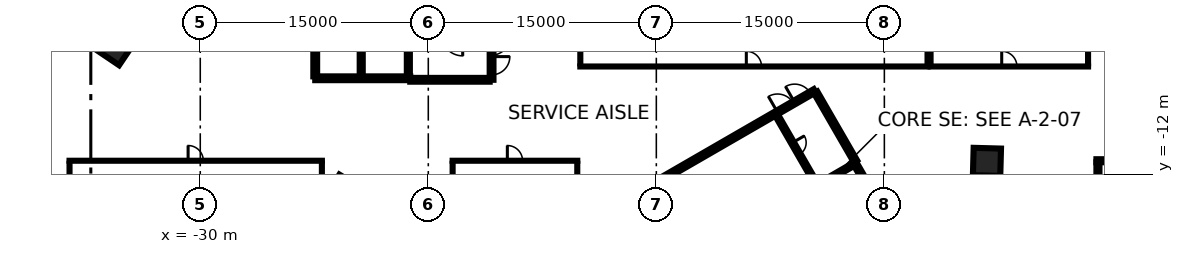
"""IFC4 building model, lengths in metres.
Left out: names, types, materials, properties, quantities, classifications, styles, units other than length and angle.
Written with IfcOpenShell. Run it as: python <this file> out.ifc"""

import sys

from ifc_helpers import new_model, si_unit, direction, frame, frame_2d, origin, origin_2d, place, context, subcontext, project, spatial, rectangle, extrude, element, fill, save


model = new_model("IFC4")
c1 = context("Model", 3, precision=1e-05, world=origin(), true_north=direction((0.0, 1.0)))
c2 = subcontext(c1, "Body", "Model", "MODEL_VIEW")
j1 = project(units=[si_unit("LENGTHUNIT", "METRE"), si_unit("PLANEANGLEUNIT", "RADIAN")], contexts=[c1])
p1 = place(None, origin())
s1 = spatial("IfcSite", under=j1, at=p1, CompositionType="ELEMENT")
p2 = place(p1, origin())
s2 = spatial("IfcBuilding", under=s1, at=p2, CompositionType="ELEMENT")
p3 = place(p2, frame((0.0, 0.0, -3.6)))
s3 = spatial("IfcBuildingStorey", under=s2, at=p3, CompositionType="ELEMENT", Elevation=-3.6)
for number, where, z_axis, x_axis in (
    (1, (21.749, -11.174, -0.4), (0.0, 0.0, 1.0), (-1.0, 0.027, 0.0)),
    (2, (-35.583, -3.565, -0.4), (0.0, 0.0, 1.0), (0.559, 0.829, 0.0)),
):
    element("IfcColumn", number, at=place(p3, frame(where, z_axis=z_axis, x_axis=x_axis)), inside=s3, PredefinedType="COLUMN", context=c2, shape_type="SweptSolid", body=[
        extrude(rectangle(XDim=1.8, YDim=1.8, at=origin_2d()), origin(), (0.0, 0.0, 1.0), 3.55),
    ])
p4 = place(p3, frame((-10.837, 5.775, 0.0), z_axis=(0.0, 0.0, 1.0), x_axis=(0.0, -1.0, 0.0)))
e3 = element("IfcWall", 3, at=p4, inside=s3, PredefinedType="SHEAR", context=c2, shape_type="SweptSolid", body=[
    extrude(rectangle(XDim=11.55, YDim=0.25, at=frame_2d((5.775, 0.0))), origin(), (0.0, 0.0, 1.0), 3.15),
])
p5 = place(p4, frame((10.025, 0.0, 0.0)))
e4 = element("IfcOpeningElement", 4, at=p5, cuts=e3, PredefinedType="OPENING", context=c2, shape_type="SweptSolid", body=[
    extrude(rectangle(XDim=1.2, YDim=2.1, at=frame_2d((0.6, 1.05))), frame((0.0, 0.135, 0.0), z_axis=(0.0, -1.0, 0.0), x_axis=(1.0, 0.0, 0.0)), (0.0, 0.0, 1.0), 0.27),
])
p6 = place(p4, frame((8.725, 0.0, 0.0)))
e5 = element("IfcOpeningElement", 5, at=p6, cuts=e3, PredefinedType="OPENING", context=c2, shape_type="SweptSolid", body=[
    extrude(rectangle(XDim=1.2, YDim=2.1, at=frame_2d((0.6, 1.05))), frame((0.0, 0.135, 0.0), z_axis=(0.0, -1.0, 0.0), x_axis=(1.0, 0.0, 0.0)), (0.0, 0.0, 1.0), 0.27),
])
p7 = place(p3, frame((-16.187, -5.675, 0.0), z_axis=(0.0, 0.0, 1.0), x_axis=(-1.0, 0.0, 0.0)))
e6 = element("IfcWall", 6, at=p7, inside=s3, PredefinedType="SHEAR", context=c2, shape_type="SweptSolid", body=[
    extrude(rectangle(XDim=6.25, YDim=0.25, at=frame_2d((3.125, 0.0))), origin(), (0.0, 0.0, 1.0), 3.15),
])
p8 = place(p3, frame((-10.963, -5.775, 0.0), z_axis=(0.0, 0.0, 1.0), x_axis=(-1.0, 0.0, 0.0)))
e7 = element("IfcWall", 7, at=p8, inside=s3, PredefinedType="SHEAR", context=c2, shape_type="SweptSolid", body=[
    extrude(rectangle(XDim=5.225, YDim=0.25, at=frame_2d((2.612, 0.0))), origin(), (0.0, 0.0, 1.0), 3.15),
])
p9 = place(p3, frame((-22.437, -5.55, 0.0), z_axis=(0.0, 0.0, 1.0), x_axis=(0.0, 1.0, 0.0)))
e8 = element("IfcWall", 8, at=p9, inside=s3, PredefinedType="SHEAR", context=c2, shape_type="SweptSolid", body=[
    extrude(rectangle(XDim=1.849, YDim=0.25, at=frame_2d((0.925, 0.0))), origin(), (0.0, 0.0, 1.0), 3.15),
])
p10 = place(p3, frame((-16.312, -2.898, 0.0), z_axis=(0.0, 0.0, 1.0), x_axis=(0.0, -1.0, 0.0)))
e9 = element("IfcWall", 9, at=p10, inside=s3, PredefinedType="SHEAR", context=c2, shape_type="SweptSolid", body=[
    extrude(rectangle(XDim=2.651, YDim=0.2, at=frame_2d((1.325, 0.0))), origin(), (0.0, 0.0, 1.0), 3.15),
])
p11 = place(p10, frame((0.652, 0.0, 0.0)))
e10 = element("IfcOpeningElement", 10, at=p11, cuts=e9, PredefinedType="OPENING", context=c2, shape_type="SweptSolid", body=[
    extrude(rectangle(XDim=1.3, YDim=2.1, at=frame_2d((0.65, 1.05))), frame((0.0, 0.11, 0.0), z_axis=(0.0, -1.0, 0.0), x_axis=(1.0, 0.0, 0.0)), (0.0, 0.0, 1.0), 0.22),
])
p12 = place(p3, frame((-19.412, -5.549, 0.0), z_axis=(0.0, 0.0, 1.0), x_axis=(0.0, 1.0, 0.0)))
e11 = element("IfcWall", 11, at=p12, inside=s3, PredefinedType="SHEAR", context=c2, shape_type="SweptSolid", body=[
    extrude(rectangle(XDim=2.651, YDim=0.2, at=frame_2d((1.325, 0.0))), origin(), (0.0, 0.0, 1.0), 3.15),
])
p13 = place(p3, frame((0.417, -12.273, 0.0), z_axis=(0.0, 0.0, 1.0), x_axis=(0.866021906294, 0.500006057782, 0.0)))
e12 = element("IfcWall", 12, at=p13, inside=s3, PredefinedType="SHEAR", context=c2, shape_type="SweptSolid", body=[
    extrude(rectangle(XDim=11.55, YDim=0.25, at=frame_2d((5.775, 0.0))), origin(), (0.0, 0.0, 1.0), 3.15),
])
p14 = place(p13, frame((10.025, 0.0, 0.0)))
e13 = element("IfcOpeningElement", 13, at=p14, cuts=e12, PredefinedType="OPENING", context=c2, shape_type="SweptSolid", body=[
    extrude(rectangle(XDim=1.2, YDim=2.1, at=frame_2d((0.6, 1.05))), frame((0.0, 0.135, 0.0), z_axis=(0.0, -1.0, 0.0), x_axis=(1.0, 0.0, 0.0)), (0.0, 0.0, 1.0), 0.27),
])
p15 = place(p13, frame((8.725, 0.0, 0.0)))
e14 = element("IfcOpeningElement", 14, at=p15, cuts=e12, PredefinedType="OPENING", context=c2, shape_type="SweptSolid", body=[
    extrude(rectangle(XDim=1.2, YDim=2.1, at=frame_2d((0.6, 1.05))), frame((0.0, 0.135, 0.0), z_axis=(0.0, -1.0, 0.0), x_axis=(1.0, 0.0, 0.0)), (0.0, 0.0, 1.0), 0.27),
])
p16 = place(p3, frame((13.008, -11.181, 0.0), z_axis=(0.0, 0.0, 1.0), x_axis=(0.500004234368, -0.866022959057, 0.0)))
e15 = element("IfcWall", 15, at=p16, inside=s3, PredefinedType="SHEAR", context=c2, shape_type="SweptSolid", body=[
    extrude(rectangle(XDim=6.25, YDim=0.25, at=frame_2d((3.125, 0.0))), origin(), (0.0, 0.0, 1.0), 3.15),
])
p17 = place(p3, frame((10.483, -6.606, 0.0), z_axis=(0.0, 0.0, 1.0), x_axis=(0.49999885962, -0.866026062182, 0.0)))
e16 = element("IfcWall", 16, at=p17, inside=s3, PredefinedType="SHEAR", context=c2, shape_type="SweptSolid", body=[
    extrude(rectangle(XDim=5.225, YDim=0.25, at=frame_2d((2.612, 0.0))), origin(), (0.0, 0.0, 1.0), 3.15),
])
p18 = place(p3, frame((7.906, -8.094, 0.0), z_axis=(0.0, 0.0, 1.0), x_axis=(0.500012186204, -0.866018367962, 0.0)))
e17 = element("IfcWall", 17, at=p18, inside=s3, PredefinedType="SHEAR", context=c2, shape_type="SweptSolid", body=[
    extrude(rectangle(XDim=5.349, YDim=0.2, at=frame_2d((2.674, 0.0))), origin(), (0.0, 0.0, 1.0), 3.15),
])
p19 = place(p18, frame((2.099, 0.0, 0.0)))
e18 = element("IfcOpeningElement", 18, at=p19, cuts=e17, PredefinedType="OPENING", context=c2, shape_type="SweptSolid", body=[
    extrude(rectangle(XDim=0.9, YDim=2.1, at=frame_2d((0.45, 1.05))), frame((0.0, 0.11, 0.0), z_axis=(0.0, -1.0, 0.0), x_axis=(1.0, 0.0, 0.0)), (0.0, 0.0, 1.0), 0.22),
])
p20 = place(p3, frame((10.668, -12.677, 0.0), z_axis=(0.0, 0.0, 1.0), x_axis=(0.866016748302, 0.500014991436, 0.0)))
e19 = element("IfcWall", 19, at=p20, inside=s3, PredefinedType="SHEAR", context=c2, shape_type="SweptSolid", body=[
    extrude(rectangle(XDim=2.649, YDim=0.2, at=frame_2d((1.324, 0.0))), origin(), (0.0, 0.0, 1.0), 3.15),
])
p21 = place(p20, frame((0.65, 0.0, 0.0)))
e20 = element("IfcOpeningElement", 20, at=p21, cuts=e19, PredefinedType="OPENING", context=c2, shape_type="SweptSolid", body=[
    extrude(rectangle(XDim=1.3, YDim=2.1, at=frame_2d((0.65, 1.05))), frame((0.0, 0.11, 0.0), z_axis=(0.0, -1.0, 0.0), x_axis=(1.0, 0.0, 0.0)), (0.0, 0.0, 1.0), 0.22),
])
p22 = place(p3, frame((-38.7, -11.1, 0.0), z_axis=(0.0, 0.0, 1.0), x_axis=(1.0, 0.0, 0.0)))
e21 = element("IfcWall", 21, at=p22, inside=s3, PredefinedType="PARTITIONING", context=c2, shape_type="SweptSolid", body=[
    extrude(rectangle(XDim=16.8, YDim=0.2, at=frame_2d((8.4, 0.0))), origin(), (0.0, 0.0, 1.0), 3.15),
])
p23 = place(p22, frame((7.9, 0.0, 0.0)))
e22 = element("IfcOpeningElement", 22, at=p23, cuts=e21, PredefinedType="OPENING", context=c2, shape_type="SweptSolid", body=[
    extrude(rectangle(XDim=1.0, YDim=2.1, at=frame_2d((0.5, 1.05))), frame((0.0, 0.11, 0.0), z_axis=(0.0, -1.0, 0.0), x_axis=(1.0, 0.0, 0.0)), (0.0, 0.0, 1.0), 0.22),
])
for number, where, z_axis, x_axis in (
    (23, (-38.6, -15.4, 0.0), (0.0, 0.0, 1.0), (0.0, 1.0, 0.0)),
    (24, (-22.0, -15.4, 0.0), (0.0, 0.0, 1.0), (0.0, 1.0, 0.0)),
):
    element("IfcWall", number, at=place(p3, frame(where, z_axis=z_axis, x_axis=x_axis)), inside=s3, PredefinedType="PARTITIONING", context=c2, shape_type="SweptSolid", body=[
        extrude(rectangle(XDim=4.2, YDim=0.2, at=frame_2d((2.1, 0.0))), origin(), (0.0, 0.0, 1.0), 3.15),
    ])
p24 = place(p3, frame((-13.5, -11.1, 0.0), z_axis=(0.0, 0.0, 1.0), x_axis=(1.0, 0.0, 0.0)))
e25 = element("IfcWall", 25, at=p24, inside=s3, PredefinedType="PARTITIONING", context=c2, shape_type="SweptSolid", body=[
    extrude(rectangle(XDim=8.4, YDim=0.2, at=frame_2d((4.2, 0.0))), origin(), (0.0, 0.0, 1.0), 3.15),
])
p25 = place(p24, frame((3.7, 0.0, 0.0)))
e26 = element("IfcOpeningElement", 26, at=p25, cuts=e25, PredefinedType="OPENING", context=c2, shape_type="SweptSolid", body=[
    extrude(rectangle(XDim=1.0, YDim=2.1, at=frame_2d((0.5, 1.05))), frame((0.0, 0.11, 0.0), z_axis=(0.0, -1.0, 0.0), x_axis=(1.0, 0.0, 0.0)), (0.0, 0.0, 1.0), 0.22),
])
for number, where, z_axis, x_axis in (
    (27, (-13.4, -15.4, 0.0), (0.0, 0.0, 1.0), (0.0, 1.0, 0.0)),
    (28, (-5.2, -15.4, 0.0), (0.0, 0.0, 1.0), (0.0, 1.0, 0.0)),
):
    element("IfcWall", number, at=place(p3, frame(where, z_axis=z_axis, x_axis=x_axis)), inside=s3, PredefinedType="PARTITIONING", context=c2, shape_type="SweptSolid", body=[
        extrude(rectangle(XDim=4.2, YDim=0.2, at=frame_2d((2.1, 0.0))), origin(), (0.0, 0.0, 1.0), 3.15),
    ])
p26 = place(p3, frame((-5.1, -4.9, 0.0), z_axis=(0.0, 0.0, 1.0), x_axis=(1.0, 0.0, 0.0)))
e29 = element("IfcWall", 29, at=p26, inside=s3, PredefinedType="PARTITIONING", context=c2, shape_type="SweptSolid", body=[
    extrude(rectangle(XDim=23.04, YDim=0.2, at=frame_2d((11.52, 0.0))), origin(), (0.0, 0.0, 1.0), 3.15),
])
p27 = place(p26, frame((11.02, 0.0, 0.0)))
e30 = element("IfcOpeningElement", 30, at=p27, cuts=e29, PredefinedType="OPENING", context=c2, shape_type="SweptSolid", body=[
    extrude(rectangle(XDim=1.0, YDim=2.1, at=frame_2d((0.5, 1.05))), frame((0.0, 0.11, 0.0), z_axis=(0.0, -1.0, 0.0), x_axis=(1.0, 0.0, 0.0)), (0.0, 0.0, 1.0), 0.22),
])
p28 = place(p3, frame((-5.0, -4.8, 0.0), z_axis=(0.0, 0.0, 1.0), x_axis=(0.0, 1.0, 0.0)))
e31 = element("IfcWall", 31, at=p28, inside=s3, PredefinedType="PARTITIONING", context=c2, shape_type="SweptSolid", body=[
    extrude(rectangle(XDim=4.2, YDim=0.2, at=frame_2d((2.1, 0.0))), origin(), (0.0, 0.0, 1.0), 3.15),
])
p29 = place(p3, frame((17.84, -4.8, 0.0), z_axis=(0.0, 0.0, 1.0), x_axis=(0.0, 1.0, 0.0)))
e32 = element("IfcWall", 32, at=p29, inside=s3, PredefinedType="PARTITIONING", context=c2, shape_type="SweptSolid", body=[
    extrude(rectangle(XDim=4.6, YDim=0.2, at=frame_2d((2.3, 0.0))), origin(), (0.0, 0.0, 1.0), 3.15),
])
p30 = place(p3, frame((17.94, -4.9, 0.0), z_axis=(0.0, 0.0, 1.0), x_axis=(1.0, 0.0, 0.0)))
e33 = element("IfcWall", 33, at=p30, inside=s3, PredefinedType="PARTITIONING", context=c2, shape_type="SweptSolid", body=[
    extrude(rectangle(XDim=10.56, YDim=0.2, at=frame_2d((5.28, 0.0))), origin(), (0.0, 0.0, 1.0), 3.15),
])
p31 = place(p30, frame((4.78, 0.0, 0.0)))
e34 = element("IfcOpeningElement", 34, at=p31, cuts=e33, PredefinedType="OPENING", context=c2, shape_type="SweptSolid", body=[
    extrude(rectangle(XDim=1.0, YDim=2.1, at=frame_2d((0.5, 1.05))), frame((0.0, 0.11, 0.0), z_axis=(0.0, -1.0, 0.0), x_axis=(1.0, 0.0, 0.0)), (0.0, 0.0, 1.0), 0.22),
])
p32 = place(p3, frame((18.04, -4.8, 0.0), z_axis=(0.0, 0.0, 1.0), x_axis=(0.0, 1.0, 0.0)))
e35 = element("IfcWall", 35, at=p32, inside=s3, PredefinedType="PARTITIONING", context=c2, shape_type="SweptSolid", body=[
    extrude(rectangle(XDim=4.6, YDim=0.2, at=frame_2d((2.3, 0.0))), origin(), (0.0, 0.0, 1.0), 3.15),
])
p33 = place(p3, frame((28.4, -4.8, 0.0), z_axis=(0.0, 0.0, 1.0), x_axis=(0.0, 1.0, 0.0)))
e36 = element("IfcWall", 36, at=p33, inside=s3, PredefinedType="PARTITIONING", context=c2, shape_type="SweptSolid", body=[
    extrude(rectangle(XDim=4.4, YDim=0.2, at=frame_2d((2.2, 0.0))), origin(), (0.0, 0.0, 1.0), 3.15),
])
p34 = place(p3, frame((29.05, -20.8, 0.0), z_axis=(0.0, 0.0, 1.0), x_axis=(0.0, 1.0, 0.0)))
e37 = element("IfcWall", 37, at=p34, inside=s3, PredefinedType="SOLIDWALL", context=c2, shape_type="SweptSolid", body=[
    extrude(rectangle(XDim=9.6, YDim=0.2, at=frame_2d((4.8, 0.0))), origin(), (0.0, 0.0, 1.0), 3.15),
])
p35 = place(p3, frame((28.95, -11.1, 0.0), z_axis=(0.0, 0.0, 1.0), x_axis=(1.0, 0.0, 0.0)))
e38 = element("IfcWall", 38, at=p35, inside=s3, PredefinedType="SOLIDWALL", context=c2, shape_type="SweptSolid", body=[
    extrude(rectangle(XDim=4.55, YDim=0.2, at=frame_2d((2.275, 0.0))), origin(), (0.0, 0.0, 1.0), 3.15),
])
p36 = place(p11, origin())
e39 = element("IfcDoor", 39, at=p36, inside=s3, OperationType="SLIDING_TO_RIGHT", PredefinedType="DOOR", context=c2, shape_type="SweptSolid", body=[
    extrude(rectangle(XDim=1.3, YDim=2.1, at=frame_2d((0.65, 1.05))), frame((0.0, 0.025, 0.0), z_axis=(0.0, -1.0, 0.0), x_axis=(1.0, 0.0, 0.0)), (0.0, 0.0, 1.0), 0.05),
])
fill(e10, e39)
p37 = place(p5, origin())
e40 = element("IfcDoor", 40, at=p37, inside=s3, OperationType="SINGLE_SWING_LEFT", PredefinedType="DOOR", context=c2, shape_type="SweptSolid", body=[
    extrude(rectangle(XDim=1.2, YDim=2.1, at=frame_2d((0.6, 1.05))), frame((0.0, 0.025, 0.0), z_axis=(0.0, -1.0, 0.0), x_axis=(1.0, 0.0, 0.0)), (0.0, 0.0, 1.0), 0.05),
])
fill(e4, e40)
p38 = place(p6, origin())
e41 = element("IfcDoor", 41, at=p38, inside=s3, OperationType="SINGLE_SWING_RIGHT", PredefinedType="DOOR", context=c2, shape_type="SweptSolid", body=[
    extrude(rectangle(XDim=1.2, YDim=2.1, at=frame_2d((0.6, 1.05))), frame((0.0, 0.025, 0.0), z_axis=(0.0, -1.0, 0.0), x_axis=(1.0, 0.0, 0.0)), (0.0, 0.0, 1.0), 0.05),
])
fill(e5, e41)
p39 = place(p21, origin())
e42 = element("IfcDoor", 42, at=p39, inside=s3, OperationType="SLIDING_TO_LEFT", PredefinedType="DOOR", context=c2, shape_type="SweptSolid", body=[
    extrude(rectangle(XDim=1.3, YDim=2.1, at=frame_2d((0.65, 1.05))), frame((0.0, 0.025, 0.0), z_axis=(0.0, -1.0, 0.0), x_axis=(1.0, 0.0, 0.0)), (0.0, 0.0, 1.0), 0.05),
])
fill(e20, e42)
p40 = place(p14, origin())
e43 = element("IfcDoor", 43, at=p40, inside=s3, OperationType="SINGLE_SWING_LEFT", PredefinedType="DOOR", context=c2, shape_type="SweptSolid", body=[
    extrude(rectangle(XDim=1.2, YDim=2.1, at=frame_2d((0.6, 1.05))), frame((0.0, 0.025, 0.0), z_axis=(0.0, -1.0, 0.0), x_axis=(1.0, 0.0, 0.0)), (0.0, 0.0, 1.0), 0.05),
])
fill(e13, e43)
p41 = place(p15, origin())
e44 = element("IfcDoor", 44, at=p41, inside=s3, OperationType="SINGLE_SWING_RIGHT", PredefinedType="DOOR", context=c2, shape_type="SweptSolid", body=[
    extrude(rectangle(XDim=1.2, YDim=2.1, at=frame_2d((0.6, 1.05))), frame((0.0, 0.025, 0.0), z_axis=(0.0, -1.0, 0.0), x_axis=(1.0, 0.0, 0.0)), (0.0, 0.0, 1.0), 0.05),
])
fill(e14, e44)
p42 = place(p19, origin())
e45 = element("IfcDoor", 45, at=p42, inside=s3, OperationType="SINGLE_SWING_LEFT", PredefinedType="DOOR", context=c2, shape_type="SweptSolid", body=[
    extrude(rectangle(XDim=0.9, YDim=2.1, at=frame_2d((0.45, 1.05))), frame((0.0, 0.025, 0.0), z_axis=(0.0, -1.0, 0.0), x_axis=(1.0, 0.0, 0.0)), (0.0, 0.0, 1.0), 0.05),
])
fill(e18, e45)
p43 = place(p23, origin())
e46 = element("IfcDoor", 46, at=p43, inside=s3, OperationType="SINGLE_SWING_LEFT", PredefinedType="DOOR", context=c2, shape_type="SweptSolid", body=[
    extrude(rectangle(XDim=1.0, YDim=2.1, at=frame_2d((0.5, 1.05))), frame((0.0, 0.025, 0.0), z_axis=(0.0, -1.0, 0.0), x_axis=(1.0, 0.0, 0.0)), (0.0, 0.0, 1.0), 0.05),
])
fill(e22, e46)
p44 = place(p25, origin())
e47 = element("IfcDoor", 47, at=p44, inside=s3, OperationType="SINGLE_SWING_LEFT", PredefinedType="DOOR", context=c2, shape_type="SweptSolid", body=[
    extrude(rectangle(XDim=1.0, YDim=2.1, at=frame_2d((0.5, 1.05))), frame((0.0, 0.025, 0.0), z_axis=(0.0, -1.0, 0.0), x_axis=(1.0, 0.0, 0.0)), (0.0, 0.0, 1.0), 0.05),
])
fill(e26, e47)
p45 = place(p27, origin())
e48 = element("IfcDoor", 48, at=p45, inside=s3, OperationType="SINGLE_SWING_LEFT", PredefinedType="DOOR", context=c2, shape_type="SweptSolid", body=[
    extrude(rectangle(XDim=1.0, YDim=2.1, at=frame_2d((0.5, 1.05))), frame((0.0, 0.025, 0.0), z_axis=(0.0, -1.0, 0.0), x_axis=(1.0, 0.0, 0.0)), (0.0, 0.0, 1.0), 0.05),
])
fill(e30, e48)
p46 = place(p31, origin())
e49 = element("IfcDoor", 49, at=p46, inside=s3, OperationType="SINGLE_SWING_LEFT", PredefinedType="DOOR", context=c2, shape_type="SweptSolid", body=[
    extrude(rectangle(XDim=1.0, YDim=2.1, at=frame_2d((0.5, 1.05))), frame((0.0, 0.025, 0.0), z_axis=(0.0, -1.0, 0.0), x_axis=(1.0, 0.0, 0.0)), (0.0, 0.0, 1.0), 0.05),
])
fill(e34, e49)
save(model, sys.argv[1])
